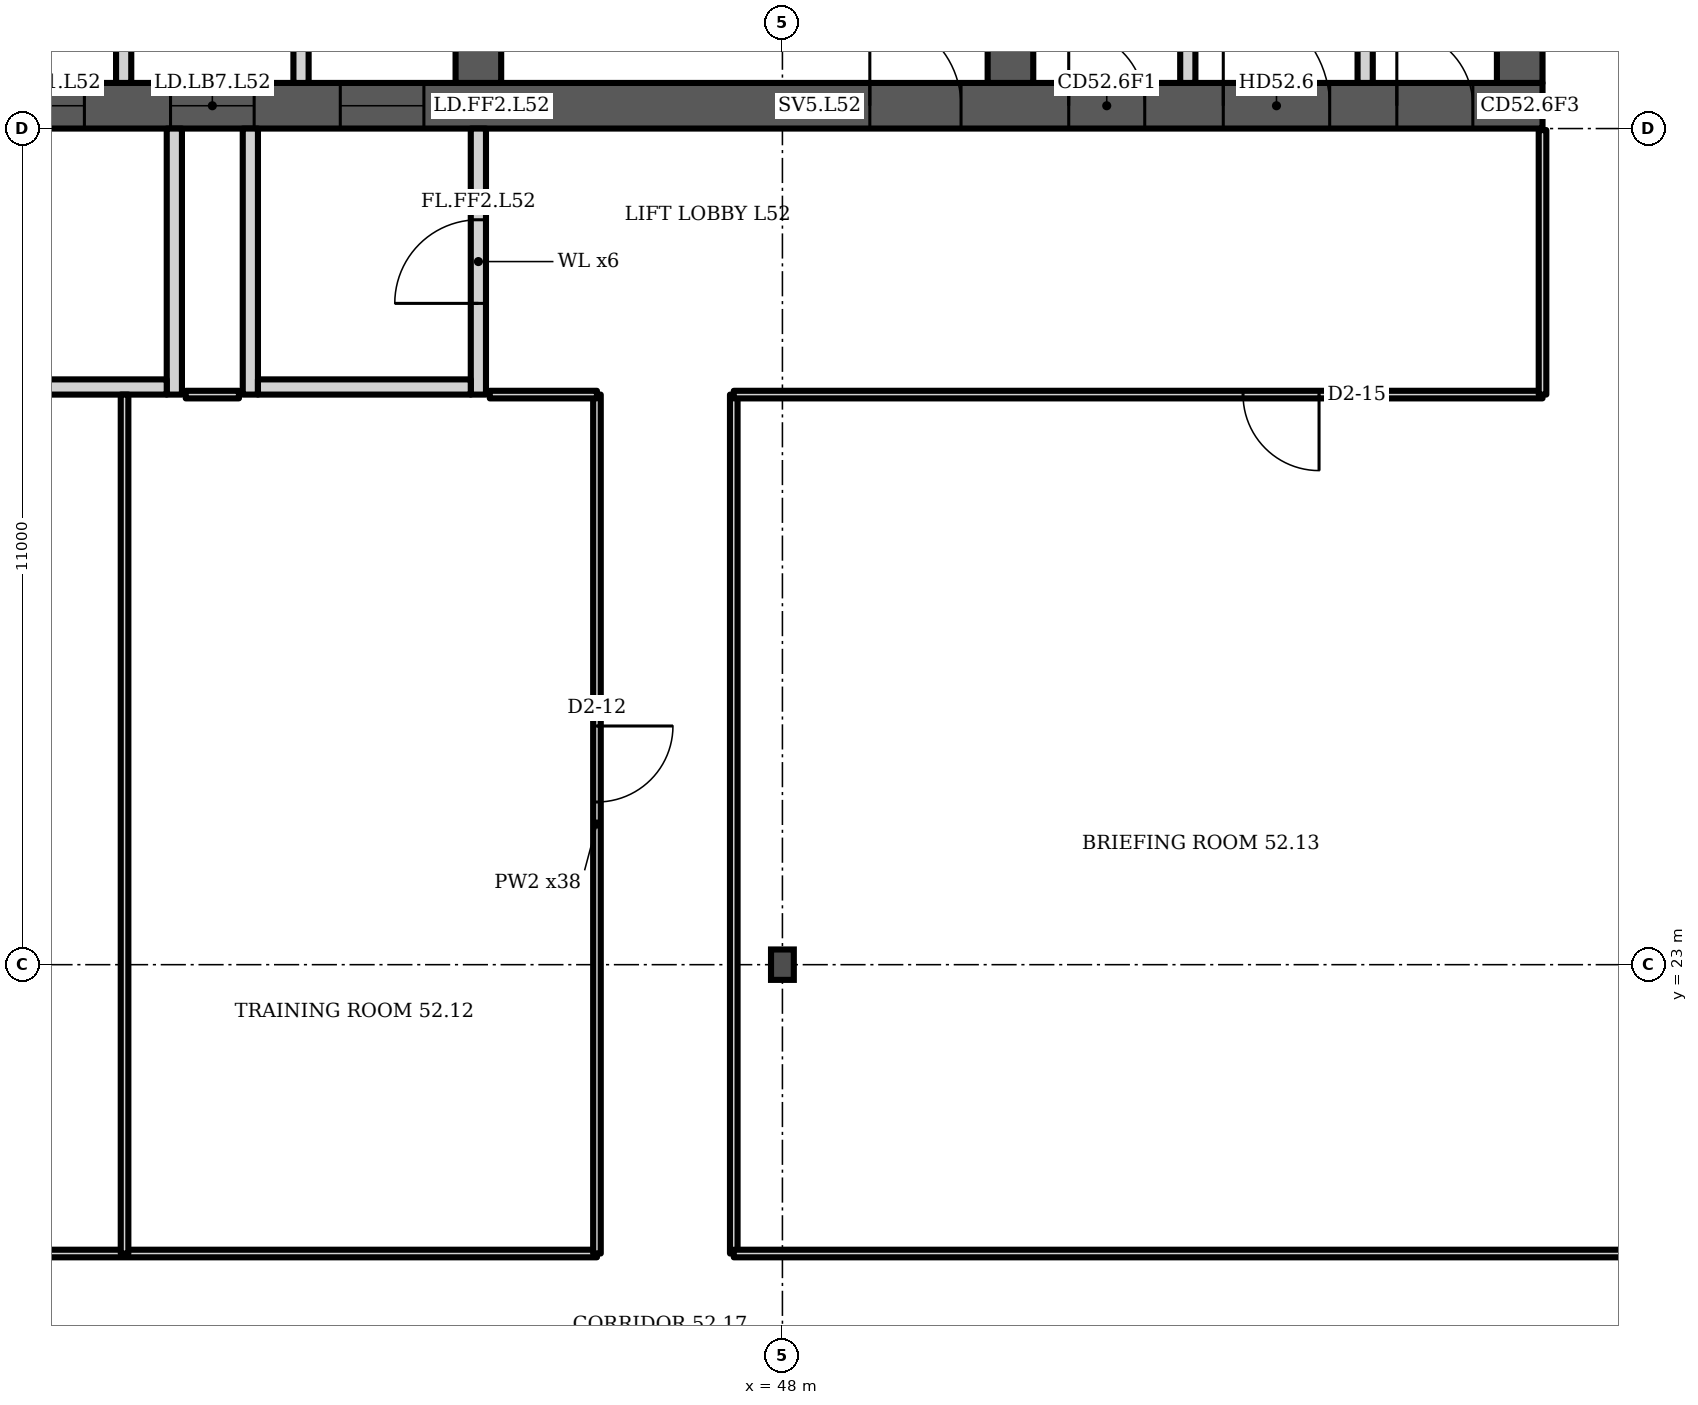
"""IFC4 building model, lengths in metres.
Left out: names, types, materials, properties, quantities, classifications, styles, units other than length and angle.
Written with IfcOpenShell. Run it as: python <this file> out.ifc"""

import sys

from ifc_helpers import new_model, si_unit, direction, frame, frame_2d, origin, origin_2d, place, context, subcontext, project, spatial, polyline, rectangle, i_section, outline, extrude, element, fill, save


model = new_model("IFC4")
c1 = context("Model", 3, precision=1e-05, world=origin(), true_north=direction((0.0, 1.0)))
c2 = subcontext(c1, "Body", "Model", "MODEL_VIEW")
j1 = project(units=[si_unit("LENGTHUNIT", "METRE"), si_unit("PLANEANGLEUNIT", "RADIAN")], contexts=[c1])
p1 = place(None, origin())
s1 = spatial("IfcSite", under=j1, at=p1, CompositionType="ELEMENT")
p2 = place(p1, origin())
s2 = spatial("IfcBuilding", under=s1, at=p2, CompositionType="ELEMENT")
p3 = place(p2, frame((0.0, 0.0, 210.7)))
s3 = spatial("IfcBuildingStorey", under=s2, at=p3, CompositionType="ELEMENT", Elevation=210.7)
p4 = place(p3, frame((23.0, 34.3, 0.0), z_axis=(0.0, 0.0, 1.0), x_axis=(1.0, 0.0, 0.0)))
e1 = element("IfcWall", 1, at=p4, inside=s3, PredefinedType="SHEAR", context=c2, shape_type="SweptSolid", body=[
    extrude(rectangle(XDim=35.0, YDim=0.6, at=frame_2d((17.5, 0.0))), origin(), (0.0, 0.0, 1.0), 3.6),
])
p5 = place(p4, frame((0.65, 0.0, 0.0)))
e2 = element("IfcOpeningElement", 2, at=p5, cuts=e1, PredefinedType="OPENING", context=c2, shape_type="SweptSolid", body=[
    extrude(rectangle(XDim=1.2, YDim=2.1, at=frame_2d((0.6, 1.05))), frame((0.0, 0.31, 0.0), z_axis=(0.0, -1.0, 0.0), x_axis=(1.0, 0.0, 0.0)), (0.0, 0.0, 1.0), 0.62),
])
p6 = place(p4, frame((7.717, 0.0, 0.0)))
e3 = element("IfcOpeningElement", 3, at=p6, cuts=e1, PredefinedType="OPENING", context=c2, shape_type="SweptSolid", body=[
    extrude(rectangle(XDim=1.1, YDim=2.1, at=frame_2d((0.55, 1.05))), frame((0.0, 0.31, 0.0), z_axis=(0.0, -1.0, 0.0), x_axis=(1.0, 0.0, 0.0)), (0.0, 0.0, 1.0), 0.62),
])
p7 = place(p4, frame((12.183, 0.0, 0.0)))
e4 = element("IfcOpeningElement", 4, at=p7, cuts=e1, PredefinedType="OPENING", context=c2, shape_type="SweptSolid", body=[
    extrude(rectangle(XDim=1.1, YDim=2.1, at=frame_2d((0.55, 1.05))), frame((0.0, 0.31, 0.0), z_axis=(0.0, -1.0, 0.0), x_axis=(1.0, 0.0, 0.0)), (0.0, 0.0, 1.0), 0.62),
])
p8 = place(p4, frame((9.8, 0.0, 0.0)))
e5 = element("IfcOpeningElement", 5, at=p8, cuts=e1, PredefinedType="OPENING", context=c2, shape_type="SweptSolid", body=[
    extrude(rectangle(XDim=1.4, YDim=2.1, at=frame_2d((0.7, 1.05))), frame((0.0, 0.31, 0.0), z_axis=(0.0, -1.0, 0.0), x_axis=(1.0, 0.0, 0.0)), (0.0, 0.0, 1.0), 0.62),
])
p9 = place(p4, frame((14.717, 0.0, 0.0)))
e6 = element("IfcOpeningElement", 6, at=p9, cuts=e1, PredefinedType="OPENING", context=c2, shape_type="SweptSolid", body=[
    extrude(rectangle(XDim=1.1, YDim=2.1, at=frame_2d((0.55, 1.05))), frame((0.0, 0.31, 0.0), z_axis=(0.0, -1.0, 0.0), x_axis=(1.0, 0.0, 0.0)), (0.0, 0.0, 1.0), 0.62),
])
p10 = place(p4, frame((16.95, 0.0, 0.0)))
e7 = element("IfcOpeningElement", 7, at=p10, cuts=e1, PredefinedType="OPENING", context=c2, shape_type="SweptSolid", body=[
    extrude(rectangle(XDim=1.1, YDim=2.1, at=frame_2d((0.55, 1.05))), frame((0.0, 0.31, 0.0), z_axis=(0.0, -1.0, 0.0), x_axis=(1.0, 0.0, 0.0)), (0.0, 0.0, 1.0), 0.62),
])
p11 = place(p4, frame((19.183, 0.0, 0.0)))
e8 = element("IfcOpeningElement", 8, at=p11, cuts=e1, PredefinedType="OPENING", context=c2, shape_type="SweptSolid", body=[
    extrude(rectangle(XDim=1.1, YDim=2.1, at=frame_2d((0.55, 1.05))), frame((0.0, 0.31, 0.0), z_axis=(0.0, -1.0, 0.0), x_axis=(1.0, 0.0, 0.0)), (0.0, 0.0, 1.0), 0.62),
])
p12 = place(p4, frame((26.15, 0.0, 0.0)))
e9 = element("IfcOpeningElement", 9, at=p12, cuts=e1, PredefinedType="OPENING", context=c2, shape_type="SweptSolid", body=[
    extrude(rectangle(XDim=1.2, YDim=2.1, at=frame_2d((0.6, 1.05))), frame((0.0, 0.31, 0.0), z_axis=(0.0, -1.0, 0.0), x_axis=(1.0, 0.0, 0.0)), (0.0, 0.0, 1.0), 0.62),
])
p13 = place(p4, frame((28.767, 0.0, 0.0)))
e10 = element("IfcOpeningElement", 10, at=p13, cuts=e1, PredefinedType="OPENING", context=c2, shape_type="SweptSolid", body=[
    extrude(rectangle(XDim=1.0, YDim=2.1, at=frame_2d((0.5, 1.05))), frame((0.0, 0.31, 0.0), z_axis=(0.0, -1.0, 0.0), x_axis=(1.0, 0.0, 0.0)), (0.0, 0.0, 1.0), 0.62),
])
p14 = place(p4, frame((33.083, 0.0, 0.0)))
e11 = element("IfcOpeningElement", 11, at=p14, cuts=e1, PredefinedType="OPENING", context=c2, shape_type="SweptSolid", body=[
    extrude(rectangle(XDim=1.0, YDim=2.1, at=frame_2d((0.5, 1.05))), frame((0.0, 0.31, 0.0), z_axis=(0.0, -1.0, 0.0), x_axis=(1.0, 0.0, 0.0)), (0.0, 0.0, 1.0), 0.62),
])
p15 = place(p4, frame((30.8, 0.0, 0.0)))
e12 = element("IfcOpeningElement", 12, at=p15, cuts=e1, PredefinedType="OPENING", context=c2, shape_type="SweptSolid", body=[
    extrude(rectangle(XDim=1.4, YDim=2.1, at=frame_2d((0.7, 1.05))), frame((0.0, 0.31, 0.0), z_axis=(0.0, -1.0, 0.0), x_axis=(1.0, 0.0, 0.0)), (0.0, 0.0, 1.0), 0.62),
])
p16 = place(p3, frame((44.0, 34.6, 0.0), z_axis=(0.0, 0.0, 1.0), x_axis=(0.0, 1.0, 0.0)))
e13 = element("IfcWall", 13, at=p16, inside=s3, PredefinedType="SHEAR", context=c2, shape_type="SweptSolid", body=[
    extrude(rectangle(XDim=14.784, YDim=0.6, at=frame_2d((7.392, 0.0))), origin(), (0.0, 0.0, 1.0), 3.6),
])
p17 = place(p16, frame((11.608, 0.0, 0.0)))
e14 = element("IfcOpeningElement", 14, at=p17, cuts=e13, PredefinedType="OPENING", context=c2, shape_type="SweptSolid", body=[
    extrude(rectangle(XDim=1.0, YDim=2.1, at=frame_2d((0.5, 1.05))), frame((0.0, 0.31, 0.0), z_axis=(0.0, -1.0, 0.0), x_axis=(1.0, 0.0, 0.0)), (0.0, 0.0, 1.0), 0.62),
])
p18 = place(p16, frame((3.8, 0.0, 0.0)))
e15 = element("IfcOpeningElement", 15, at=p18, cuts=e13, PredefinedType="OPENING", context=c2, shape_type="SweptSolid", body=[
    extrude(rectangle(XDim=1.1, YDim=2.1, at=frame_2d((0.55, 1.05))), frame((0.0, 0.31, 0.0), z_axis=(0.0, -1.0, 0.0), x_axis=(1.0, 0.0, 0.0)), (0.0, 0.0, 1.0), 0.62),
])
p19 = place(p3, frame((51.0, 34.6, 0.0), z_axis=(0.0, 0.0, 1.0), x_axis=(0.0, 1.0, 0.0)))
e16 = element("IfcWall", 16, at=p19, inside=s3, PredefinedType="SHEAR", context=c2, shape_type="SweptSolid", body=[
    extrude(rectangle(XDim=14.171, YDim=0.6, at=frame_2d((7.085, 0.0))), origin(), (0.0, 0.0, 1.0), 3.6),
])
p20 = place(p19, frame((3.8, 0.0, 0.0)))
e17 = element("IfcOpeningElement", 17, at=p20, cuts=e16, PredefinedType="OPENING", context=c2, shape_type="SweptSolid", body=[
    extrude(rectangle(XDim=1.1, YDim=2.1, at=frame_2d((0.55, 1.05))), frame((0.0, 0.31, 0.0), z_axis=(0.0, -1.0, 0.0), x_axis=(1.0, 0.0, 0.0)), (0.0, 0.0, 1.0), 0.62),
])
p21 = place(p3, frame((57.7, 34.6, 0.0), z_axis=(0.0, 0.0, 1.0), x_axis=(0.0, 1.0, 0.0)))
e18 = element("IfcWall", 18, at=p21, inside=s3, PredefinedType="SHEAR", context=c2, shape_type="SweptSolid", body=[
    extrude(rectangle(XDim=13.585, YDim=0.6, at=frame_2d((6.792, 0.0))), origin(), (0.0, 0.0, 1.0), 3.6),
])
p22 = place(p3, frame((48.0, 23.0, 0.0), z_axis=(0.0, 0.0, 1.0), x_axis=(1.0, 0.0, 0.0)))
e19 = element("IfcColumn", 19, at=p22, inside=s3, PredefinedType="COLUMN", context=c2, shape_type="SweptSolid", body=[
    extrude(i_section(OverallWidth=0.3, OverallDepth=0.4, WebThickness=0.013, FlangeThickness=0.024, FilletRadius=0.027, at=origin_2d()), origin(), (0.0, 0.0, 1.0), 3.6),
])
p23 = place(p3, frame((0.0, 0.0, -0.0)))
e20 = element("IfcWall", 20, at=p23, inside=s3, PredefinedType="PARTITIONING", context=c2, shape_type="SweptSolid", body=[
    extrude(outline(polyline([(41.567, 37.1), (39.433, 37.1), (39.433, 34.6), (39.233, 34.6), (39.233, 37.45), (37.3, 37.45), (37.3, 37.65), (39.233, 37.65), (39.433, 37.65), (39.433, 37.3), (41.567, 37.3), (41.567, 37.35), (41.767, 37.35), (43.7, 37.35), (43.7, 37.15), (41.767, 37.15), (41.767, 34.6), (41.567, 34.6), (41.567, 37.1)])), origin(), (0.0, 0.0, 1.0), 3.2),
])
p24 = place(p3, frame((0.0, 0.0, -0.0)))
e21 = element("IfcWall", 21, at=p24, inside=s3, PredefinedType="PARTITIONING", context=c2, shape_type="SweptSolid", body=[
    extrude(outline(polyline([(53.233, 34.6), (53.233, 37.3), (53.433, 37.3), (53.433, 34.6), (53.233, 34.6)])), origin(), (0.0, 0.0, 1.0), 3.2),
])
p25 = place(p3, frame((0.0, 0.0, -0.0)))
e22 = element("IfcWall", 22, at=p25, inside=s3, PredefinedType="PARTITIONING", context=c2, shape_type="SweptSolid", body=[
    extrude(outline(polyline([(55.567, 34.6), (55.567, 37.3), (55.767, 37.3), (55.767, 34.6), (55.567, 34.6)])), origin(), (0.0, 0.0, 1.0), 3.2),
])
p26 = place(p3, frame((40.0, 30.5, 0.0), z_axis=(0.0, 0.0, 1.0), x_axis=(0.0, 1.0, 0.0)))
e23 = element("IfcWall", 23, at=p26, inside=s3, PredefinedType="PARTITIONING", context=c2, shape_type="SweptSolid", body=[
    extrude(rectangle(XDim=3.5, YDim=0.2, at=frame_2d((1.75, 0.0))), origin(), (0.0, 0.0, 1.0), 3.2),
])
p27 = place(p3, frame((37.1, 30.6, 0.0), z_axis=(0.0, 0.0, 1.0), x_axis=(1.0, 0.0, 0.0)))
e24 = element("IfcWall", 24, at=p27, inside=s3, PredefinedType="PARTITIONING", context=c2, shape_type="SweptSolid", body=[
    extrude(rectangle(XDim=2.8, YDim=0.2, at=frame_2d((1.4, 0.0))), origin(), (0.0, 0.0, 1.0), 3.2),
])
p28 = place(p3, frame((41.0, 30.5, 0.0), z_axis=(0.0, 0.0, 1.0), x_axis=(0.0, 1.0, 0.0)))
e25 = element("IfcWall", 25, at=p28, inside=s3, PredefinedType="PARTITIONING", context=c2, shape_type="SweptSolid", body=[
    extrude(rectangle(XDim=3.5, YDim=0.2, at=frame_2d((1.75, 0.0))), origin(), (0.0, 0.0, 1.0), 3.2),
])
p29 = place(p3, frame((44.0, 30.5, 0.0), z_axis=(0.0, 0.0, 1.0), x_axis=(0.0, 1.0, 0.0)))
e26 = element("IfcWall", 26, at=p29, inside=s3, PredefinedType="PARTITIONING", context=c2, shape_type="SweptSolid", body=[
    extrude(rectangle(XDim=3.5, YDim=0.2, at=frame_2d((1.75, 0.0))), origin(), (0.0, 0.0, 1.0), 3.2),
])
p30 = place(p29, frame((1.2, 0.0, 0.0)))
e27 = element("IfcOpeningElement", 27, at=p30, cuts=e26, PredefinedType="OPENING", context=c2, shape_type="SweptSolid", body=[
    extrude(rectangle(XDim=1.1, YDim=2.1, at=frame_2d((0.55, 1.05))), frame((0.0, 0.11, 0.0), z_axis=(0.0, -1.0, 0.0), x_axis=(1.0, 0.0, 0.0)), (0.0, 0.0, 1.0), 0.22),
])
p31 = place(p3, frame((41.1, 30.6, 0.0), z_axis=(0.0, 0.0, 1.0), x_axis=(1.0, 0.0, 0.0)))
e28 = element("IfcWall", 28, at=p31, inside=s3, PredefinedType="PARTITIONING", context=c2, shape_type="SweptSolid", body=[
    extrude(rectangle(XDim=2.8, YDim=0.2, at=frame_2d((1.4, 0.0))), origin(), (0.0, 0.0, 1.0), 3.2),
])
p32 = place(p3, frame((24.8, 19.2, 0.0), z_axis=(0.0, 0.0, 1.0), x_axis=(1.0, 0.0, 0.0)))
e29 = element("IfcWall", 29, at=p32, inside=s3, PredefinedType="PARTITIONING", context=c2, shape_type="SweptSolid", body=[
    extrude(rectangle(XDim=20.76, YDim=0.1, at=frame_2d((10.38, 0.0))), origin(), (0.0, 0.0, 1.0), 3.2),
])
p33 = place(p32, frame((5.825, 0.0, 0.0)))
e30 = element("IfcOpeningElement", 30, at=p33, cuts=e29, PredefinedType="OPENING", context=c2, shape_type="SweptSolid", body=[
    extrude(rectangle(XDim=1.0, YDim=2.1, at=frame_2d((0.5, 1.05))), frame((0.0, 0.06, 0.0), z_axis=(0.0, -1.0, 0.0), x_axis=(1.0, 0.0, 0.0)), (0.0, 0.0, 1.0), 0.12),
])
p34 = place(p3, frame((39.345, 19.2, 0.0), z_axis=(0.0, 0.0, 1.0), x_axis=(0.0, 1.0, 0.0)))
e31 = element("IfcWall", 31, at=p34, inside=s3, PredefinedType="PARTITIONING", context=c2, shape_type="SweptSolid", body=[
    extrude(rectangle(XDim=11.3, YDim=0.1, at=frame_2d((5.65, 0.0))), origin(), (0.0, 0.0, 1.0), 3.2),
])
p35 = place(p3, frame((45.56, 19.2, 0.0), z_axis=(0.0, 0.0, 1.0), x_axis=(0.0, 1.0, 0.0)))
e32 = element("IfcWall", 32, at=p35, inside=s3, PredefinedType="PARTITIONING", context=c2, shape_type="SweptSolid", body=[
    extrude(rectangle(XDim=11.3, YDim=0.1, at=frame_2d((5.65, 0.0))), origin(), (0.0, 0.0, 1.0), 3.2),
])
p36 = place(p35, frame((5.94, 0.0, 0.0)))
e33 = element("IfcOpeningElement", 33, at=p36, cuts=e32, PredefinedType="OPENING", context=c2, shape_type="SweptSolid", body=[
    extrude(rectangle(XDim=1.0, YDim=2.1, at=frame_2d((0.5, 1.05))), frame((0.0, 0.06, 0.0), z_axis=(0.0, -1.0, 0.0), x_axis=(1.0, 0.0, 0.0)), (0.0, 0.0, 1.0), 0.12),
])
p37 = place(p3, frame((47.36, 19.2, 0.0), z_axis=(0.0, 0.0, 1.0), x_axis=(0.0, 1.0, 0.0)))
e34 = element("IfcWall", 34, at=p37, inside=s3, PredefinedType="PARTITIONING", context=c2, shape_type="SweptSolid", body=[
    extrude(rectangle(XDim=11.3, YDim=0.1, at=frame_2d((5.65, 0.0))), origin(), (0.0, 0.0, 1.0), 3.2),
])
p38 = place(p3, frame((47.36, 19.2, 0.0), z_axis=(0.0, 0.0, 1.0), x_axis=(1.0, 0.0, 0.0)))
e35 = element("IfcWall", 35, at=p38, inside=s3, PredefinedType="PARTITIONING", context=c2, shape_type="SweptSolid", body=[
    extrude(rectangle(XDim=17.71, YDim=0.1, at=frame_2d((8.855, 0.0))), origin(), (0.0, 0.0, 1.0), 3.2),
])
p39 = place(p3, frame((47.36, 30.5, 0.0), z_axis=(0.0, 0.0, 1.0), x_axis=(1.0, 0.0, 0.0)))
e36 = element("IfcWall", 36, at=p39, inside=s3, PredefinedType="PARTITIONING", context=c2, shape_type="SweptSolid", body=[
    extrude(rectangle(XDim=10.64, YDim=0.1, at=frame_2d((5.32, 0.0))), origin(), (0.0, 0.0, 1.0), 3.2),
])
p40 = place(p39, frame((6.7, 0.0, 0.0)))
e37 = element("IfcOpeningElement", 37, at=p40, cuts=e36, PredefinedType="OPENING", context=c2, shape_type="SweptSolid", body=[
    extrude(rectangle(XDim=1.0, YDim=2.1, at=frame_2d((0.5, 1.05))), frame((0.0, 0.06, 0.0), z_axis=(0.0, -1.0, 0.0), x_axis=(1.0, 0.0, 0.0)), (0.0, 0.0, 1.0), 0.12),
])
p41 = place(p3, frame((58.0, 30.5, 0.0), z_axis=(0.0, 0.0, 1.0), x_axis=(0.0, 1.0, 0.0)))
e38 = element("IfcWall", 38, at=p41, inside=s3, PredefinedType="PARTITIONING", context=c2, shape_type="SweptSolid", body=[
    extrude(rectangle(XDim=3.48, YDim=0.1, at=frame_2d((1.74, 0.0))), origin(), (0.0, 0.0, 1.0), 3.2),
])
p42 = place(p3, frame((40.15, 30.5, 0.0), z_axis=(0.0, 0.0, 1.0), x_axis=(1.0, 0.0, 0.0)))
e39 = element("IfcWall", 39, at=p42, inside=s3, PredefinedType="PARTITIONING", context=c2, shape_type="SweptSolid", body=[
    extrude(rectangle(XDim=0.7, YDim=0.1, at=frame_2d((0.35, 0.0))), origin(), (0.0, 0.0, 1.0), 3.2),
])
p43 = place(p3, frame((44.15, 30.5, 0.0), z_axis=(0.0, 0.0, 1.0), x_axis=(1.0, 0.0, 0.0)))
e40 = element("IfcWall", 40, at=p43, inside=s3, PredefinedType="PARTITIONING", context=c2, shape_type="SweptSolid", body=[
    extrude(rectangle(XDim=1.41, YDim=0.1, at=frame_2d((0.705, 0.0))), origin(), (0.0, 0.0, 1.0), 3.2),
])
p44 = place(p9, origin())
e41 = element("IfcDoor", 41, at=p44, inside=s3, OperationType="DOUBLE_DOOR_SLIDING", PredefinedType="DOOR", context=c2, shape_type="SweptSolid", body=[
    extrude(rectangle(XDim=1.1, YDim=2.1, at=frame_2d((0.55, 1.05))), frame((0.0, 0.025, 0.0), z_axis=(0.0, -1.0, 0.0), x_axis=(1.0, 0.0, 0.0)), (0.0, 0.0, 1.0), 0.05),
])
fill(e6, e41)
p45 = place(p10, origin())
e42 = element("IfcDoor", 42, at=p45, inside=s3, OperationType="DOUBLE_DOOR_SLIDING", PredefinedType="DOOR", context=c2, shape_type="SweptSolid", body=[
    extrude(rectangle(XDim=1.1, YDim=2.1, at=frame_2d((0.55, 1.05))), frame((0.0, 0.025, 0.0), z_axis=(0.0, -1.0, 0.0), x_axis=(1.0, 0.0, 0.0)), (0.0, 0.0, 1.0), 0.05),
])
fill(e7, e42)
p46 = place(p11, origin())
e43 = element("IfcDoor", 43, at=p46, inside=s3, OperationType="DOUBLE_DOOR_SLIDING", PredefinedType="DOOR", context=c2, shape_type="SweptSolid", body=[
    extrude(rectangle(XDim=1.1, YDim=2.1, at=frame_2d((0.55, 1.05))), frame((0.0, 0.025, 0.0), z_axis=(0.0, -1.0, 0.0), x_axis=(1.0, 0.0, 0.0)), (0.0, 0.0, 1.0), 0.05),
])
fill(e8, e43)
p47 = place(p12, origin())
e44 = element("IfcDoor", 44, at=p47, inside=s3, OperationType="SINGLE_SWING_LEFT", PredefinedType="DOOR", context=c2, shape_type="SweptSolid", body=[
    extrude(rectangle(XDim=1.2, YDim=2.1, at=frame_2d((0.6, 1.05))), frame((0.0, 0.025, 0.0), z_axis=(0.0, -1.0, 0.0), x_axis=(1.0, 0.0, 0.0)), (0.0, 0.0, 1.0), 0.05),
])
fill(e9, e44)
p48 = place(p13, origin())
e45 = element("IfcDoor", 45, at=p48, inside=s3, OperationType="SINGLE_SWING_LEFT", PredefinedType="DOOR", context=c2, shape_type="SweptSolid", body=[
    extrude(rectangle(XDim=1.0, YDim=2.1, at=frame_2d((0.5, 1.05))), frame((0.0, 0.025, 0.0), z_axis=(0.0, -1.0, 0.0), x_axis=(1.0, 0.0, 0.0)), (0.0, 0.0, 1.0), 0.05),
])
fill(e10, e45)
p49 = place(p14, origin())
e46 = element("IfcDoor", 46, at=p49, inside=s3, OperationType="SINGLE_SWING_LEFT", PredefinedType="DOOR", context=c2, shape_type="SweptSolid", body=[
    extrude(rectangle(XDim=1.0, YDim=2.1, at=frame_2d((0.5, 1.05))), frame((0.0, 0.025, 0.0), z_axis=(0.0, -1.0, 0.0), x_axis=(1.0, 0.0, 0.0)), (0.0, 0.0, 1.0), 0.05),
])
fill(e11, e46)
p50 = place(p15, origin())
e47 = element("IfcDoor", 47, at=p50, inside=s3, OperationType="DOUBLE_DOOR_SINGLE_SWING", PredefinedType="DOOR", context=c2, shape_type="SweptSolid", body=[
    extrude(rectangle(XDim=1.4, YDim=2.1, at=frame_2d((0.7, 1.05))), frame((0.0, 0.025, 0.0), z_axis=(0.0, -1.0, 0.0), x_axis=(1.0, 0.0, 0.0)), (0.0, 0.0, 1.0), 0.05),
])
fill(e12, e47)
p51 = place(p30, origin())
e48 = element("IfcDoor", 48, at=p51, inside=s3, OperationType="SINGLE_SWING_LEFT", PredefinedType="DOOR", context=c2, shape_type="SweptSolid", body=[
    extrude(rectangle(XDim=1.1, YDim=2.1, at=frame_2d((0.55, 1.05))), frame((0.0, 0.025, 0.0), z_axis=(0.0, -1.0, 0.0), x_axis=(1.0, 0.0, 0.0)), (0.0, 0.0, 1.0), 0.05),
])
fill(e27, e48)
p52 = place(p36, origin())
e49 = element("IfcDoor", 49, at=p52, inside=s3, OperationType="SINGLE_SWING_RIGHT", PredefinedType="DOOR", context=c2, shape_type="SweptSolid", body=[
    extrude(rectangle(XDim=1.0, YDim=2.1, at=frame_2d((0.5, 1.05))), frame((0.0, 0.025, 0.0), z_axis=(0.0, -1.0, 0.0), x_axis=(1.0, 0.0, 0.0)), (0.0, 0.0, 1.0), 0.05),
])
fill(e33, e49)
p53 = place(p40, origin())
e50 = element("IfcDoor", 50, at=p53, inside=s3, OperationType="SINGLE_SWING_RIGHT", PredefinedType="DOOR", context=c2, shape_type="SweptSolid", body=[
    extrude(rectangle(XDim=1.0, YDim=2.1, at=frame_2d((0.5, 1.05))), frame((0.0, 0.025, 0.0), z_axis=(0.0, -1.0, 0.0), x_axis=(1.0, 0.0, 0.0)), (0.0, 0.0, 1.0), 0.05),
])
fill(e37, e50)
save(model, sys.argv[1])
